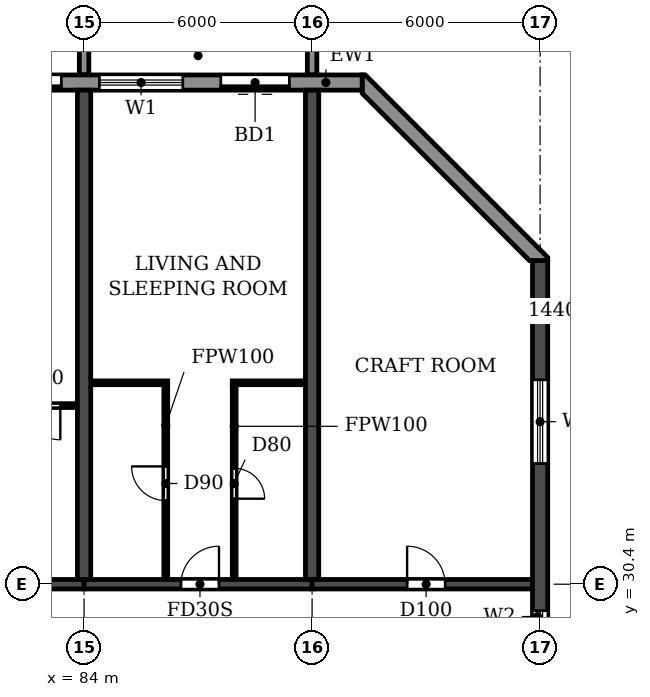
"""IFC4 building model, lengths in metres.
Left out: names, types, materials, properties, quantities, classifications, styles, units other than length and angle.
Written with IfcOpenShell. Run it as: python <this file> out.ifc"""

import sys

from ifc_helpers import new_model, si_unit, direction, frame, frame_2d, origin, place, context, subcontext, project, spatial, polyline, rectangle, outline, extrude, source, transform, mapped, element, fill, save


model = new_model("IFC4")
c1 = context("Model", 3, precision=1e-05, world=origin(), true_north=direction((0.0, 1.0)))
c2 = subcontext(c1, "Body", "Model", "MODEL_VIEW")
j1 = project(units=[si_unit("LENGTHUNIT", "METRE"), si_unit("PLANEANGLEUNIT", "RADIAN")], contexts=[c1])
p1 = place(None, origin())
s1 = spatial("IfcSite", under=j1, at=p1, CompositionType="ELEMENT")
p2 = place(p1, origin())
s2 = spatial("IfcBuilding", under=s1, at=p2, CompositionType="ELEMENT")
p3 = place(p2, frame((0.0, 0.0, 72.9)))
s3 = spatial("IfcBuildingStorey", under=s2, at=p3, CompositionType="ELEMENT", Elevation=72.9)
for number, where, z_axis, x_axis in (
    (1, (84.0, 30.525, 0.0), (0.0, 0.0, 1.0), (0.0, 1.0, 0.0)),
    (2, (90.0, 30.525, 0.0), (0.0, 0.0, 1.0), (0.0, 1.0, 0.0)),
):
    element("IfcWall", number, at=place(p3, frame(where, z_axis=z_axis, x_axis=x_axis)), inside=s3, PredefinedType="SHEAR", context=c2, shape_type="SweptSolid", body=[
        extrude(rectangle(XDim=12.875, YDim=0.35, at=frame_2d((6.438, 0.0))), origin(), (0.0, 0.0, 1.0), 3.06),
    ])
p4 = place(p3, frame((96.0, 4.683, 0.0), z_axis=(0.0, 0.0, 1.0), x_axis=(0.0, 1.0, 0.0)))
e3 = element("IfcWall", 3, at=p4, inside=s3, PredefinedType="SHEAR", context=c2, shape_type="SweptSolid", body=[
    extrude(rectangle(XDim=34.234, YDim=0.4, at=frame_2d((17.117, 0.0))), origin(), (0.0, 0.0, 1.0), 3.06),
])
p5 = place(p4, frame((15.917, 0.0, 0.9)))
e4 = element("IfcOpeningElement", 4, at=p5, cuts=e3, PredefinedType="OPENING", context=c2, shape_type="SweptSolid", body=[
    extrude(rectangle(XDim=1.2, YDim=1.5, at=frame_2d((0.6, 0.75))), frame((0.0, 0.21, 0.0), z_axis=(0.0, -1.0, 0.0), x_axis=(1.0, 0.0, 0.0)), (0.0, 0.0, 1.0), 0.42),
])
p6 = place(p4, frame((23.817, 0.0, 0.9)))
e5 = element("IfcOpeningElement", 5, at=p6, cuts=e3, PredefinedType="OPENING", context=c2, shape_type="SweptSolid", body=[
    extrude(rectangle(XDim=1.2, YDim=1.5, at=frame_2d((0.6, 0.75))), frame((0.0, 0.21, 0.0), z_axis=(0.0, -1.0, 0.0), x_axis=(1.0, 0.0, 0.0)), (0.0, 0.0, 1.0), 0.42),
])
p7 = place(p4, frame((8.017, 0.0, 0.9)))
e6 = element("IfcOpeningElement", 6, at=p7, cuts=e3, PredefinedType="OPENING", context=c2, shape_type="SweptSolid", body=[
    extrude(rectangle(XDim=1.2, YDim=1.5, at=frame_2d((0.6, 0.75))), frame((0.0, 0.21, 0.0), z_axis=(0.0, -1.0, 0.0), x_axis=(1.0, 0.0, 0.0)), (0.0, 0.0, 1.0), 0.42),
])
p8 = place(p4, frame((28.894, 0.0, 0.6)))
e7 = element("IfcOpeningElement", 7, at=p8, cuts=e3, PredefinedType="OPENING", context=c2, shape_type="SweptSolid", body=[
    extrude(rectangle(XDim=2.2, YDim=1.8, at=frame_2d((1.1, 0.9))), frame((0.0, 0.21, 0.0), z_axis=(0.0, -1.0, 0.0), x_axis=(1.0, 0.0, 0.0)), (0.0, 0.0, 1.0), 0.42),
])
p9 = place(p4, frame((2.541, 0.0, 0.6)))
e8 = element("IfcOpeningElement", 8, at=p9, cuts=e3, PredefinedType="OPENING", context=c2, shape_type="SweptSolid", body=[
    extrude(rectangle(XDim=2.2, YDim=1.8, at=frame_2d((1.1, 0.9))), frame((0.0, 0.21, 0.0), z_axis=(0.0, -1.0, 0.0), x_axis=(1.0, 0.0, 0.0)), (0.0, 0.0, 1.0), 0.42),
])
p10 = place(p3, frame((78.0, 30.4, 0.0), z_axis=(0.0, 0.0, 1.0), x_axis=(1.0, 0.0, 0.0)))
e9 = element("IfcWall", 9, at=p10, inside=s3, PredefinedType="SHEAR", context=c2, shape_type="SweptSolid", body=[
    extrude(rectangle(XDim=6.0, YDim=0.25, at=frame_2d((3.0, 0.0))), origin(), (0.0, 0.0, 1.0), 2.46),
])
p11 = place(p10, frame((2.45, 0.0, 0.0)))
e10 = element("IfcOpeningElement", 10, at=p11, cuts=e9, PredefinedType="OPENING", context=c2, shape_type="SweptSolid", body=[
    extrude(rectangle(XDim=1.0, YDim=2.1, at=frame_2d((0.5, 1.05))), frame((0.0, 0.135, 0.0), z_axis=(0.0, -1.0, 0.0), x_axis=(1.0, 0.0, 0.0)), (0.0, 0.0, 1.0), 0.27),
])
p12 = place(p3, frame((84.0, 30.4, 0.0), z_axis=(0.0, 0.0, 1.0), x_axis=(1.0, 0.0, 0.0)))
e11 = element("IfcWall", 11, at=p12, inside=s3, PredefinedType="SHEAR", context=c2, shape_type="SweptSolid", body=[
    extrude(rectangle(XDim=6.0, YDim=0.25, at=frame_2d((3.0, 0.0))), origin(), (0.0, 0.0, 1.0), 2.46),
])
p13 = place(p12, frame((2.55, 0.0, 0.0)))
e12 = element("IfcOpeningElement", 12, at=p13, cuts=e11, PredefinedType="OPENING", context=c2, shape_type="SweptSolid", body=[
    extrude(rectangle(XDim=1.0, YDim=2.1, at=frame_2d((0.5, 1.05))), frame((0.0, 0.135, 0.0), z_axis=(0.0, -1.0, 0.0), x_axis=(1.0, 0.0, 0.0)), (0.0, 0.0, 1.0), 0.27),
])
p14 = place(p3, frame((90.0, 30.4, 0.0), z_axis=(0.0, 0.0, 1.0), x_axis=(1.0, 0.0, 0.0)))
e13 = element("IfcWall", 13, at=p14, inside=s3, PredefinedType="SHEAR", context=c2, shape_type="SweptSolid", body=[
    extrude(rectangle(XDim=5.8, YDim=0.25, at=frame_2d((2.9, 0.0))), origin(), (0.0, 0.0, 1.0), 2.46),
])
p15 = place(p14, frame((2.5, 0.0, 0.0)))
e14 = element("IfcOpeningElement", 14, at=p15, cuts=e13, PredefinedType="OPENING", context=c2, shape_type="SweptSolid", body=[
    extrude(rectangle(XDim=1.0, YDim=2.1, at=frame_2d((0.5, 1.05))), frame((0.0, 0.135, 0.0), z_axis=(0.0, -1.0, 0.0), x_axis=(1.0, 0.0, 0.0)), (0.0, 0.0, 1.0), 0.27),
])
p16 = place(p3, origin())
e15 = element("IfcWall", 15, at=p16, inside=s3, PredefinedType="STANDARD", context=c2, shape_type="SweptSolid", body=[
    extrude(outline(polyline([(96.2, 38.917), (96.2, 39.0), (91.4, 43.8), (91.317, 43.8), (91.317, 43.317), (95.717, 38.917), (96.2, 38.917)])), origin(), (0.0, 0.0, 1.0), 3.06),
])
p17 = place(p3, frame((91.317, 43.6, 0.0), z_axis=(0.0, 0.0, 1.0), x_axis=(-1.0, 0.0, 0.0)))
e16 = element("IfcWall", 16, at=p17, inside=s3, PredefinedType="STANDARD", context=c2, shape_type="SweptSolid", body=[
    extrude(rectangle(XDim=80.634, YDim=0.4, at=frame_2d((40.317, 0.0))), origin(), (0.0, 0.0, 1.0), 3.06),
])
p18 = place(p17, frame((76.717, 0.0, 0.9)))
e17 = element("IfcOpeningElement", 17, at=p18, cuts=e16, PredefinedType="OPENING", context=c2, shape_type="SweptSolid", body=[
    extrude(rectangle(XDim=2.2, YDim=1.5, at=frame_2d((1.1, 0.75))), frame((0.0, 0.21, 0.0), z_axis=(0.0, -1.0, 0.0), x_axis=(1.0, 0.0, 0.0)), (0.0, 0.0, 1.0), 0.42),
])
p19 = place(p17, frame((73.917, 0.0, 0.0)))
e18 = element("IfcOpeningElement", 18, at=p19, cuts=e16, PredefinedType="OPENING", context=c2, shape_type="SweptSolid", body=[
    extrude(rectangle(XDim=1.8, YDim=2.4, at=frame_2d((0.9, 1.2))), frame((0.0, 0.21, 0.0), z_axis=(0.0, -1.0, 0.0), x_axis=(1.0, 0.0, 0.0)), (0.0, 0.0, 1.0), 0.42),
])
p20 = place(p17, frame((70.917, 0.0, 0.0)))
e19 = element("IfcOpeningElement", 19, at=p20, cuts=e16, PredefinedType="OPENING", context=c2, shape_type="SweptSolid", body=[
    extrude(rectangle(XDim=1.8, YDim=2.4, at=frame_2d((0.9, 1.2))), frame((0.0, 0.21, 0.0), z_axis=(0.0, -1.0, 0.0), x_axis=(1.0, 0.0, 0.0)), (0.0, 0.0, 1.0), 0.42),
])
p21 = place(p17, frame((67.717, 0.0, 0.9)))
e20 = element("IfcOpeningElement", 20, at=p21, cuts=e16, PredefinedType="OPENING", context=c2, shape_type="SweptSolid", body=[
    extrude(rectangle(XDim=2.2, YDim=1.5, at=frame_2d((1.1, 0.75))), frame((0.0, 0.21, 0.0), z_axis=(0.0, -1.0, 0.0), x_axis=(1.0, 0.0, 0.0)), (0.0, 0.0, 1.0), 0.42),
])
p22 = place(p17, frame((64.717, 0.0, 0.9)))
e21 = element("IfcOpeningElement", 21, at=p22, cuts=e16, PredefinedType="OPENING", context=c2, shape_type="SweptSolid", body=[
    extrude(rectangle(XDim=2.2, YDim=1.5, at=frame_2d((1.1, 0.75))), frame((0.0, 0.21, 0.0), z_axis=(0.0, -1.0, 0.0), x_axis=(1.0, 0.0, 0.0)), (0.0, 0.0, 1.0), 0.42),
])
p23 = place(p17, frame((61.917, 0.0, 0.0)))
e22 = element("IfcOpeningElement", 22, at=p23, cuts=e16, PredefinedType="OPENING", context=c2, shape_type="SweptSolid", body=[
    extrude(rectangle(XDim=1.8, YDim=2.4, at=frame_2d((0.9, 1.2))), frame((0.0, 0.21, 0.0), z_axis=(0.0, -1.0, 0.0), x_axis=(1.0, 0.0, 0.0)), (0.0, 0.0, 1.0), 0.42),
])
p24 = place(p17, frame((58.717, 0.0, 0.9)))
e23 = element("IfcOpeningElement", 23, at=p24, cuts=e16, PredefinedType="OPENING", context=c2, shape_type="SweptSolid", body=[
    extrude(rectangle(XDim=2.2, YDim=1.5, at=frame_2d((1.1, 0.75))), frame((0.0, 0.21, 0.0), z_axis=(0.0, -1.0, 0.0), x_axis=(1.0, 0.0, 0.0)), (0.0, 0.0, 1.0), 0.42),
])
p25 = place(p17, frame((55.917, 0.0, 0.0)))
e24 = element("IfcOpeningElement", 24, at=p25, cuts=e16, PredefinedType="OPENING", context=c2, shape_type="SweptSolid", body=[
    extrude(rectangle(XDim=1.8, YDim=2.4, at=frame_2d((0.9, 1.2))), frame((0.0, 0.21, 0.0), z_axis=(0.0, -1.0, 0.0), x_axis=(1.0, 0.0, 0.0)), (0.0, 0.0, 1.0), 0.42),
])
p26 = place(p17, frame((52.717, 0.0, 0.9)))
e25 = element("IfcOpeningElement", 25, at=p26, cuts=e16, PredefinedType="OPENING", context=c2, shape_type="SweptSolid", body=[
    extrude(rectangle(XDim=2.2, YDim=1.5, at=frame_2d((1.1, 0.75))), frame((0.0, 0.21, 0.0), z_axis=(0.0, -1.0, 0.0), x_axis=(1.0, 0.0, 0.0)), (0.0, 0.0, 1.0), 0.42),
])
p27 = place(p17, frame((49.717, 0.0, 0.9)))
e26 = element("IfcOpeningElement", 26, at=p27, cuts=e16, PredefinedType="OPENING", context=c2, shape_type="SweptSolid", body=[
    extrude(rectangle(XDim=2.2, YDim=1.5, at=frame_2d((1.1, 0.75))), frame((0.0, 0.21, 0.0), z_axis=(0.0, -1.0, 0.0), x_axis=(1.0, 0.0, 0.0)), (0.0, 0.0, 1.0), 0.42),
])
p28 = place(p17, frame((46.917, 0.0, 0.0)))
e27 = element("IfcOpeningElement", 27, at=p28, cuts=e16, PredefinedType="OPENING", context=c2, shape_type="SweptSolid", body=[
    extrude(rectangle(XDim=1.8, YDim=2.4, at=frame_2d((0.9, 1.2))), frame((0.0, 0.21, 0.0), z_axis=(0.0, -1.0, 0.0), x_axis=(1.0, 0.0, 0.0)), (0.0, 0.0, 1.0), 0.42),
])
p29 = place(p17, frame((43.717, 0.0, 0.9)))
e28 = element("IfcOpeningElement", 28, at=p29, cuts=e16, PredefinedType="OPENING", context=c2, shape_type="SweptSolid", body=[
    extrude(rectangle(XDim=2.2, YDim=1.5, at=frame_2d((1.1, 0.75))), frame((0.0, 0.21, 0.0), z_axis=(0.0, -1.0, 0.0), x_axis=(1.0, 0.0, 0.0)), (0.0, 0.0, 1.0), 0.42),
])
p30 = place(p17, frame((40.717, 0.0, 0.9)))
e29 = element("IfcOpeningElement", 29, at=p30, cuts=e16, PredefinedType="OPENING", context=c2, shape_type="SweptSolid", body=[
    extrude(rectangle(XDim=2.2, YDim=1.5, at=frame_2d((1.1, 0.75))), frame((0.0, 0.21, 0.0), z_axis=(0.0, -1.0, 0.0), x_axis=(1.0, 0.0, 0.0)), (0.0, 0.0, 1.0), 0.42),
])
p31 = place(p17, frame((37.917, 0.0, 0.0)))
e30 = element("IfcOpeningElement", 30, at=p31, cuts=e16, PredefinedType="OPENING", context=c2, shape_type="SweptSolid", body=[
    extrude(rectangle(XDim=1.8, YDim=2.4, at=frame_2d((0.9, 1.2))), frame((0.0, 0.21, 0.0), z_axis=(0.0, -1.0, 0.0), x_axis=(1.0, 0.0, 0.0)), (0.0, 0.0, 1.0), 0.42),
])
p32 = place(p17, frame((34.717, 0.0, 0.9)))
e31 = element("IfcOpeningElement", 31, at=p32, cuts=e16, PredefinedType="OPENING", context=c2, shape_type="SweptSolid", body=[
    extrude(rectangle(XDim=2.2, YDim=1.5, at=frame_2d((1.1, 0.75))), frame((0.0, 0.21, 0.0), z_axis=(0.0, -1.0, 0.0), x_axis=(1.0, 0.0, 0.0)), (0.0, 0.0, 1.0), 0.42),
])
p33 = place(p17, frame((31.917, 0.0, 0.0)))
e32 = element("IfcOpeningElement", 32, at=p33, cuts=e16, PredefinedType="OPENING", context=c2, shape_type="SweptSolid", body=[
    extrude(rectangle(XDim=1.8, YDim=2.4, at=frame_2d((0.9, 1.2))), frame((0.0, 0.21, 0.0), z_axis=(0.0, -1.0, 0.0), x_axis=(1.0, 0.0, 0.0)), (0.0, 0.0, 1.0), 0.42),
])
p34 = place(p17, frame((28.717, 0.0, 0.9)))
e33 = element("IfcOpeningElement", 33, at=p34, cuts=e16, PredefinedType="OPENING", context=c2, shape_type="SweptSolid", body=[
    extrude(rectangle(XDim=2.2, YDim=1.5, at=frame_2d((1.1, 0.75))), frame((0.0, 0.21, 0.0), z_axis=(0.0, -1.0, 0.0), x_axis=(1.0, 0.0, 0.0)), (0.0, 0.0, 1.0), 0.42),
])
p35 = place(p17, frame((25.717, 0.0, 0.9)))
e34 = element("IfcOpeningElement", 34, at=p35, cuts=e16, PredefinedType="OPENING", context=c2, shape_type="SweptSolid", body=[
    extrude(rectangle(XDim=2.2, YDim=1.5, at=frame_2d((1.1, 0.75))), frame((0.0, 0.21, 0.0), z_axis=(0.0, -1.0, 0.0), x_axis=(1.0, 0.0, 0.0)), (0.0, 0.0, 1.0), 0.42),
])
p36 = place(p17, frame((22.717, 0.0, 0.9)))
e35 = element("IfcOpeningElement", 35, at=p36, cuts=e16, PredefinedType="OPENING", context=c2, shape_type="SweptSolid", body=[
    extrude(rectangle(XDim=2.2, YDim=1.5, at=frame_2d((1.1, 0.75))), frame((0.0, 0.21, 0.0), z_axis=(0.0, -1.0, 0.0), x_axis=(1.0, 0.0, 0.0)), (0.0, 0.0, 1.0), 0.42),
])
p37 = place(p17, frame((19.917, 0.0, 0.0)))
e36 = element("IfcOpeningElement", 36, at=p37, cuts=e16, PredefinedType="OPENING", context=c2, shape_type="SweptSolid", body=[
    extrude(rectangle(XDim=1.8, YDim=2.4, at=frame_2d((0.9, 1.2))), frame((0.0, 0.21, 0.0), z_axis=(0.0, -1.0, 0.0), x_axis=(1.0, 0.0, 0.0)), (0.0, 0.0, 1.0), 0.42),
])
p38 = place(p17, frame((16.717, 0.0, 0.9)))
e37 = element("IfcOpeningElement", 37, at=p38, cuts=e16, PredefinedType="OPENING", context=c2, shape_type="SweptSolid", body=[
    extrude(rectangle(XDim=2.2, YDim=1.5, at=frame_2d((1.1, 0.75))), frame((0.0, 0.21, 0.0), z_axis=(0.0, -1.0, 0.0), x_axis=(1.0, 0.0, 0.0)), (0.0, 0.0, 1.0), 0.42),
])
p39 = place(p17, frame((13.717, 0.0, 0.9)))
e38 = element("IfcOpeningElement", 38, at=p39, cuts=e16, PredefinedType="OPENING", context=c2, shape_type="SweptSolid", body=[
    extrude(rectangle(XDim=2.2, YDim=1.5, at=frame_2d((1.1, 0.75))), frame((0.0, 0.21, 0.0), z_axis=(0.0, -1.0, 0.0), x_axis=(1.0, 0.0, 0.0)), (0.0, 0.0, 1.0), 0.42),
])
p40 = place(p17, frame((10.717, 0.0, 0.9)))
e39 = element("IfcOpeningElement", 39, at=p40, cuts=e16, PredefinedType="OPENING", context=c2, shape_type="SweptSolid", body=[
    extrude(rectangle(XDim=2.2, YDim=1.5, at=frame_2d((1.1, 0.75))), frame((0.0, 0.21, 0.0), z_axis=(0.0, -1.0, 0.0), x_axis=(1.0, 0.0, 0.0)), (0.0, 0.0, 1.0), 0.42),
])
p41 = place(p17, frame((7.917, 0.0, 0.0)))
e40 = element("IfcOpeningElement", 40, at=p41, cuts=e16, PredefinedType="OPENING", context=c2, shape_type="SweptSolid", body=[
    extrude(rectangle(XDim=1.8, YDim=2.4, at=frame_2d((0.9, 1.2))), frame((0.0, 0.21, 0.0), z_axis=(0.0, -1.0, 0.0), x_axis=(1.0, 0.0, 0.0)), (0.0, 0.0, 1.0), 0.42),
])
p42 = place(p17, frame((4.717, 0.0, 0.9)))
e41 = element("IfcOpeningElement", 41, at=p42, cuts=e16, PredefinedType="OPENING", context=c2, shape_type="SweptSolid", body=[
    extrude(rectangle(XDim=2.2, YDim=1.5, at=frame_2d((1.1, 0.75))), frame((0.0, 0.21, 0.0), z_axis=(0.0, -1.0, 0.0), x_axis=(1.0, 0.0, 0.0)), (0.0, 0.0, 1.0), 0.42),
])
p43 = place(p17, frame((1.917, 0.0, 0.0)))
e42 = element("IfcOpeningElement", 42, at=p43, cuts=e16, PredefinedType="OPENING", context=c2, shape_type="SweptSolid", body=[
    extrude(rectangle(XDim=1.8, YDim=2.4, at=frame_2d((0.9, 1.2))), frame((0.0, 0.21, 0.0), z_axis=(0.0, -1.0, 0.0), x_axis=(1.0, 0.0, 0.0)), (0.0, 0.0, 1.0), 0.42),
])
m1 = source(origin(), c2, "Body", "SweptSolid", [
    extrude(outline(polyline([(0.0, 0.0), (0.25, 0.0), (0.25, 3.1), (0.0, 3.1), (0.0, 0.0)])), origin(), (0.0, 0.0, 1.0), 3.1),
])
for number, where in (
    (43, (83.875, 43.8, 0.0)),
    (44, (89.875, 43.8, 0.0)),
):
    element("IfcWall", number, at=place(p3, frame(where)), inside=s3, PredefinedType="STANDARD", context=c2, shape_type="MappedRepresentation", body=[
        mapped(m1, transform((0.0, 0.0, 0.0))),
    ])
p44 = place(p3, frame((81.8, 35.1, 0.0), z_axis=(0.0, 0.0, 1.0), x_axis=(1.0, 0.0, 0.0)))
e45 = element("IfcWall", 45, at=p44, inside=s3, PredefinedType="PARTITIONING", context=c2, shape_type="SweptSolid", body=[
    extrude(rectangle(XDim=2.015, YDim=0.1, at=frame_2d((1.007, 0.0))), origin(), (0.0, 0.0, 1.0), 3.06),
])
p45 = place(p44, frame((0.675, 0.0, 0.0)))
e46 = element("IfcOpeningElement", 46, at=p45, cuts=e45, PredefinedType="OPENING", context=c2, shape_type="SweptSolid", body=[
    extrude(rectangle(XDim=0.9, YDim=2.1, at=frame_2d((0.45, 1.05))), frame((0.0, 0.06, 0.0), z_axis=(0.0, -1.0, 0.0), x_axis=(1.0, 0.0, 0.0)), (0.0, 0.0, 1.0), 0.12),
])
p46 = place(p3, frame((84.185, 35.7, 0.0), z_axis=(0.0, 0.0, 1.0), x_axis=(1.0, 0.0, 0.0)))
e47 = element("IfcWall", 47, at=p46, inside=s3, PredefinedType="PARTITIONING", context=c2, shape_type="SweptSolid", body=[
    extrude(rectangle(XDim=2.015, YDim=0.1, at=frame_2d((1.007, 0.0))), origin(), (0.0, 0.0, 1.0), 3.06),
])
p47 = place(p3, frame((87.9, 35.7, 0.0), z_axis=(0.0, 0.0, 1.0), x_axis=(1.0, 0.0, 0.0)))
e48 = element("IfcWall", 48, at=p47, inside=s3, PredefinedType="PARTITIONING", context=c2, shape_type="SweptSolid", body=[
    extrude(rectangle(XDim=1.915, YDim=0.1, at=frame_2d((0.958, 0.0))), origin(), (0.0, 0.0, 1.0), 3.06),
])
p48 = place(p3, frame((86.15, 30.535, 0.0), z_axis=(0.0, 0.0, 1.0), x_axis=(0.0, 1.0, 0.0)))
e49 = element("IfcWall", 49, at=p48, inside=s3, PredefinedType="PARTITIONING", context=c2, shape_type="SweptSolid", body=[
    extrude(rectangle(XDim=5.115, YDim=0.1, at=frame_2d((2.558, 0.0))), origin(), (0.0, 0.0, 1.0), 3.06),
])
p49 = place(p48, frame((2.065, 0.0, 0.0)))
e50 = element("IfcOpeningElement", 50, at=p49, cuts=e49, PredefinedType="OPENING", context=c2, shape_type="SweptSolid", body=[
    extrude(rectangle(XDim=0.9, YDim=2.1, at=frame_2d((0.45, 1.05))), frame((0.0, 0.06, 0.0), z_axis=(0.0, -1.0, 0.0), x_axis=(1.0, 0.0, 0.0)), (0.0, 0.0, 1.0), 0.12),
])
p50 = place(p3, frame((87.95, 30.535, 0.0), z_axis=(0.0, 0.0, 1.0), x_axis=(0.0, 1.0, 0.0)))
e51 = element("IfcWall", 51, at=p50, inside=s3, PredefinedType="PARTITIONING", context=c2, shape_type="SweptSolid", body=[
    extrude(rectangle(XDim=5.115, YDim=0.1, at=frame_2d((2.558, 0.0))), origin(), (0.0, 0.0, 1.0), 3.06),
])
p51 = place(p50, frame((2.115, 0.0, 0.0)))
e52 = element("IfcOpeningElement", 52, at=p51, cuts=e51, PredefinedType="OPENING", context=c2, shape_type="SweptSolid", body=[
    extrude(rectangle(XDim=0.8, YDim=2.1, at=frame_2d((0.4, 1.05))), frame((0.0, 0.06, 0.0), z_axis=(0.0, -1.0, 0.0), x_axis=(1.0, 0.0, 0.0)), (0.0, 0.0, 1.0), 0.12),
])
p52 = place(p6, origin())
e53 = element("IfcWindow", 53, at=p52, inside=s3, PartitioningType="SINGLE_PANEL", PredefinedType="WINDOW", context=c2, shape_type="SweptSolid", body=[
    extrude(rectangle(XDim=1.2, YDim=1.5, at=frame_2d((0.6, 0.75))), frame((0.0, 0.03, 0.0), z_axis=(0.0, -1.0, 0.0), x_axis=(1.0, 0.0, 0.0)), (0.0, 0.0, 1.0), 0.06),
])
fill(e5, e53)
p53 = place(p8, origin())
e54 = element("IfcWindow", 54, at=p53, inside=s3, PartitioningType="DOUBLE_PANEL_HORIZONTAL", PredefinedType="WINDOW", context=c2, shape_type="SweptSolid", body=[
    extrude(rectangle(XDim=2.2, YDim=1.8, at=frame_2d((1.1, 0.9))), frame((0.0, 0.03, 0.0), z_axis=(0.0, -1.0, 0.0), x_axis=(1.0, 0.0, 0.0)), (0.0, 0.0, 1.0), 0.06),
])
fill(e7, e54)
p54 = place(p41, origin())
e55 = element("IfcDoor", 55, at=p54, inside=s3, OperationType="DOUBLE_DOOR_SLIDING", PredefinedType="DOOR", context=c2, shape_type="SweptSolid", body=[
    extrude(rectangle(XDim=1.8, YDim=2.4, at=frame_2d((0.9, 1.2))), frame((0.0, 0.025, 0.0), z_axis=(0.0, -1.0, 0.0), x_axis=(1.0, 0.0, 0.0)), (0.0, 0.0, 1.0), 0.05),
])
fill(e40, e55)
p55 = place(p42, origin())
e56 = element("IfcWindow", 56, at=p55, inside=s3, PartitioningType="DOUBLE_PANEL_HORIZONTAL", PredefinedType="WINDOW", context=c2, shape_type="SweptSolid", body=[
    extrude(rectangle(XDim=2.2, YDim=1.5, at=frame_2d((1.1, 0.75))), frame((0.0, 0.03, 0.0), z_axis=(0.0, -1.0, 0.0), x_axis=(1.0, 0.0, 0.0)), (0.0, 0.0, 1.0), 0.06),
])
fill(e41, e56)
p56 = place(p43, origin())
e57 = element("IfcDoor", 57, at=p56, inside=s3, OperationType="DOUBLE_DOOR_SLIDING", PredefinedType="DOOR", context=c2, shape_type="SweptSolid", body=[
    extrude(rectangle(XDim=1.8, YDim=2.4, at=frame_2d((0.9, 1.2))), frame((0.0, 0.025, 0.0), z_axis=(0.0, -1.0, 0.0), x_axis=(1.0, 0.0, 0.0)), (0.0, 0.0, 1.0), 0.05),
])
fill(e42, e57)
p57 = place(p45, frame((0.9, 0.0, 0.0), z_axis=(0.0, 0.0, 1.0), x_axis=(-1.0, 0.0, 0.0)))
e58 = element("IfcDoor", 58, at=p57, inside=s3, OperationType="SINGLE_SWING_LEFT", PredefinedType="DOOR", context=c2, shape_type="SweptSolid", body=[
    extrude(rectangle(XDim=0.9, YDim=2.1, at=frame_2d((0.45, 1.05))), frame((0.0, 0.025, 0.0), z_axis=(0.0, -1.0, 0.0), x_axis=(1.0, 0.0, 0.0)), (0.0, 0.0, 1.0), 0.05),
])
fill(e46, e58)
p58 = place(p49, origin())
e59 = element("IfcDoor", 59, at=p58, inside=s3, OperationType="SINGLE_SWING_RIGHT", PredefinedType="DOOR", context=c2, shape_type="SweptSolid", body=[
    extrude(rectangle(XDim=0.9, YDim=2.1, at=frame_2d((0.45, 1.05))), frame((0.0, 0.025, 0.0), z_axis=(0.0, -1.0, 0.0), x_axis=(1.0, 0.0, 0.0)), (0.0, 0.0, 1.0), 0.05),
])
fill(e50, e59)
p59 = place(p13, origin())
e60 = element("IfcDoor", 60, at=p59, inside=s3, OperationType="SINGLE_SWING_RIGHT", PredefinedType="DOOR", context=c2, shape_type="SweptSolid", body=[
    extrude(rectangle(XDim=1.0, YDim=2.1, at=frame_2d((0.5, 1.05))), frame((0.0, 0.025, 0.0), z_axis=(0.0, -1.0, 0.0), x_axis=(1.0, 0.0, 0.0)), (0.0, 0.0, 1.0), 0.05),
])
fill(e12, e60)
p60 = place(p51, frame((0.8, 0.0, 0.0), z_axis=(0.0, 0.0, 1.0), x_axis=(-1.0, 0.0, 0.0)))
e61 = element("IfcDoor", 61, at=p60, inside=s3, OperationType="SINGLE_SWING_RIGHT", PredefinedType="DOOR", context=c2, shape_type="SweptSolid", body=[
    extrude(rectangle(XDim=0.8, YDim=2.1, at=frame_2d((0.4, 1.05))), frame((0.0, 0.025, 0.0), z_axis=(0.0, -1.0, 0.0), x_axis=(1.0, 0.0, 0.0)), (0.0, 0.0, 1.0), 0.05),
])
fill(e52, e61)
p61 = place(p15, origin())
e62 = element("IfcDoor", 62, at=p61, inside=s3, OperationType="SINGLE_SWING_LEFT", PredefinedType="DOOR", context=c2, shape_type="SweptSolid", body=[
    extrude(rectangle(XDim=1.0, YDim=2.1, at=frame_2d((0.5, 1.05))), frame((0.0, 0.025, 0.0), z_axis=(0.0, -1.0, 0.0), x_axis=(1.0, 0.0, 0.0)), (0.0, 0.0, 1.0), 0.05),
])
fill(e14, e62)
save(model, sys.argv[1])
